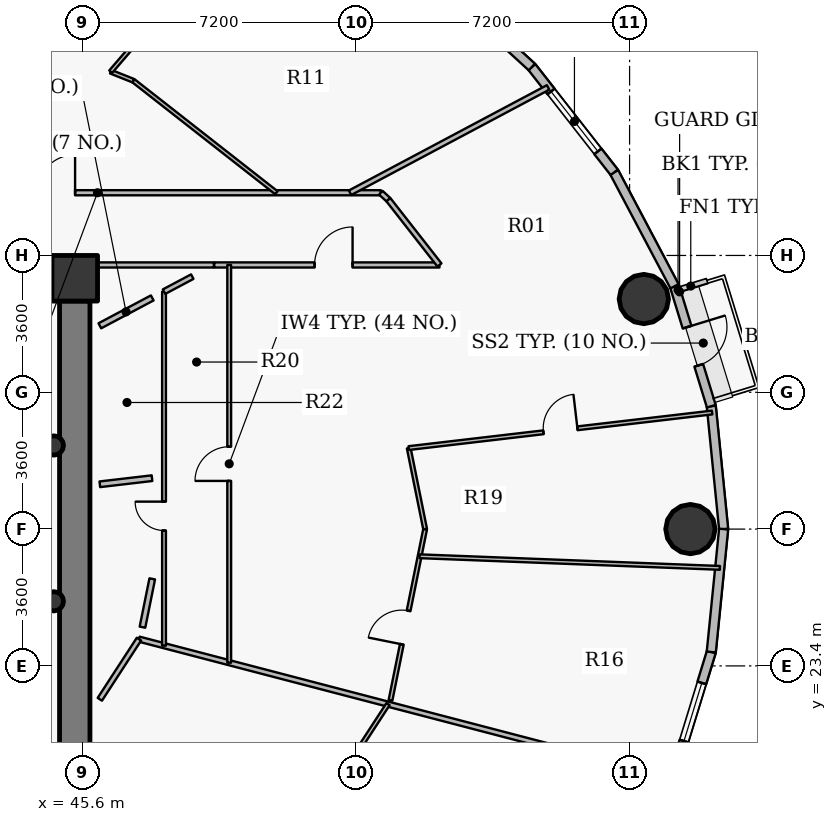
"""IFC4 building model, lengths in metres.
Left out: names, types, materials, properties, quantities, classifications, styles, units other than length and angle.
Written with IfcOpenShell. Run it as: python <this file> out.ifc"""

import sys

from ifc_helpers import new_model, si_unit, direction, frame, frame_2d, origin, origin_2d, place, context, subcontext, project, spatial, rectangle, hollow_circle, extrude, source, transform, mapped, element, fill, save


model = new_model("IFC4")
c1 = context("Model", 3, precision=1e-05, world=origin(), true_north=direction((0.0, 1.0)))
c2 = subcontext(c1, "Body", "Model", "MODEL_VIEW")
j1 = project(units=[si_unit("LENGTHUNIT", "METRE"), si_unit("PLANEANGLEUNIT", "RADIAN")], contexts=[c1])
p1 = place(None, origin())
s1 = spatial("IfcSite", under=j1, at=p1, CompositionType="ELEMENT")
p2 = place(p1, origin())
s2 = spatial("IfcBuilding", under=s1, at=p2, CompositionType="ELEMENT")
p3 = place(p2, frame((0.0, 0.0, 178.65)))
s3 = spatial("IfcBuildingStorey", under=s2, at=p3, CompositionType="ELEMENT", Elevation=178.65)
p4 = place(p3, frame((45.4, 33.6, 0.0), z_axis=(0.0, 0.0, 1.0), x_axis=(1.0, 0.0, 0.0)))
e1 = element("IfcColumn", 1, at=p4, inside=s3, PredefinedType="COLUMN", context=c2, shape_type="SweptSolid", body=[
    extrude(rectangle(XDim=1.2, YDim=1.2, at=origin_2d()), origin(), (0.0, 0.0, 1.0), 3.75),
])
p5 = place(p3, frame((45.4, 33.0, 0.0), z_axis=(0.0, 0.0, 1.0), x_axis=(0.0, -1.0, 0.0)))
e2 = element("IfcWall", 2, at=p5, inside=s3, PredefinedType="SHEAR", context=c2, shape_type="SweptSolid", body=[
    extrude(rectangle(XDim=12.0, YDim=0.8, at=frame_2d((6.0, 0.0))), origin(), (0.0, 0.0, 1.0), 2.95),
])
for number, where, z_axis, x_axis in (
    (3, (61.6, 27.0, 0.0), (0.0, 0.0, 1.0), (1.0, 0.0, 0.0)),
    (4, (60.375, 33.053, 0.0), (0.0, 0.0, 1.0), (1.0, 0.0, 0.0)),
):
    element("IfcColumn", number, at=place(p3, frame(where, z_axis=z_axis, x_axis=x_axis)), inside=s3, PredefinedType="COLUMN", context=c2, shape_type="SweptSolid", body=[
        extrude(hollow_circle(Radius=0.65, WallThickness=0.04, at=origin_2d()), origin(), (0.0, 0.0, 1.0), 3.75),
    ])
for number, where, z_axis, x_axis in (
    (5, (44.85, 25.1, 0.0), (0.0, 0.0, 1.0), (1.0, 0.0, 0.0)),
    (6, (44.85, 29.2, 0.0), (0.0, 0.0, 1.0), (1.0, 0.0, 0.0)),
):
    element("IfcColumn", number, at=place(p3, frame(where, z_axis=z_axis, x_axis=x_axis)), inside=s3, PredefinedType="COLUMN", context=c2, shape_type="SweptSolid", body=[
        extrude(hollow_circle(Radius=0.254, WallThickness=0.02, at=origin_2d()), origin(), (0.0, 0.0, 1.0), 3.75),
    ])
p6 = place(p3, frame((62.15, 30.234, 0.0), z_axis=(0.0, 0.0, 1.0), x_axis=(0.100061534614, -0.994981250723, 0.0)))
e7 = element("IfcWall", 7, at=p6, inside=s3, PredefinedType="SOLIDWALL", context=c2, shape_type="SweptSolid", body=[
    extrude(rectangle(XDim=3.25, YDim=0.24, at=frame_2d((1.625, 0.0))), origin(), (0.0, 0.0, 1.0), 3.5),
])
p7 = place(p3, frame((61.183, 33.389, 0.0), z_axis=(0.0, 0.0, 1.0), x_axis=(0.293097995113, -0.956082405058, 0.0)))
e8 = element("IfcWall", 8, at=p7, inside=s3, PredefinedType="SOLIDWALL", context=c2, shape_type="SweptSolid", body=[
    extrude(rectangle(XDim=3.3, YDim=0.24, at=frame_2d((1.65, 0.0))), origin(), (0.0, 0.0, 1.0), 3.5),
])
p8 = place(p7, frame((1.125, 0.0, 0.0)))
e9 = element("IfcOpeningElement", 9, at=p8, cuts=e8, PredefinedType="OPENING", context=c2, shape_type="SweptSolid", body=[
    extrude(rectangle(XDim=1.05, YDim=2.15, at=origin_2d()), frame((0.525, 0.13, 1.075), z_axis=(0.0, -1.0, 0.0), x_axis=(1.0, 0.0, 0.0)), (0.0, 0.0, 1.0), 0.26),
])
p9 = place(p3, frame((59.596, 36.388, 0.0), z_axis=(0.0, 0.0, 1.0), x_axis=(0.467586874938, -0.88394712194, 0.0)))
e10 = element("IfcWall", 10, at=p9, inside=s3, PredefinedType="SOLIDWALL", context=c2, shape_type="SweptSolid", body=[
    extrude(rectangle(XDim=3.393, YDim=0.24, at=frame_2d((1.697, 0.0))), origin(), (0.0, 0.0, 1.0), 3.5),
])
p10 = place(p3, frame((57.428, 39.158, 0.0), z_axis=(0.0, 0.0, 1.0), x_axis=(0.616287674549, -0.787521112224, 0.0)))
e11 = element("IfcWall", 11, at=p10, inside=s3, PredefinedType="SOLIDWALL", context=c2, shape_type="SweptSolid", body=[
    extrude(rectangle(XDim=3.517, YDim=0.24, at=frame_2d((1.759, 0.0))), origin(), (0.0, 0.0, 1.0), 3.5),
])
p11 = place(p10, frame((0.819, 0.0, 0.9)))
e12 = element("IfcOpeningElement", 12, at=p11, cuts=e11, PredefinedType="OPENING", context=c2, shape_type="SweptSolid", body=[
    extrude(rectangle(XDim=2.0, YDim=1.75, at=origin_2d()), frame((1.0, 0.13, 0.875), z_axis=(0.0, -1.0, 0.0), x_axis=(1.0, 0.0, 0.0)), (0.0, 0.0, 1.0), 0.26),
])
p12 = place(p3, frame((54.732, 41.631, 0.0), z_axis=(0.0, 0.0, 1.0), x_axis=(0.737076565834, -0.675809245349, 0.0)))
e13 = element("IfcWall", 13, at=p12, inside=s3, PredefinedType="SOLIDWALL", context=c2, shape_type="SweptSolid", body=[
    extrude(rectangle(XDim=3.658, YDim=0.24, at=frame_2d((1.829, 0.0))), origin(), (0.0, 0.0, 1.0), 3.5),
])
p13 = place(p3, frame((62.15, 23.766, 0.0), z_axis=(0.0, 0.0, 1.0), x_axis=(-0.293097995113, -0.956082405058, 0.0)))
e14 = element("IfcWall", 14, at=p13, inside=s3, PredefinedType="SOLIDWALL", context=c2, shape_type="SweptSolid", body=[
    extrude(rectangle(XDim=3.3, YDim=0.24, at=frame_2d((1.65, 0.0))), origin(), (0.0, 0.0, 1.0), 3.5),
])
p14 = place(p13, frame((0.85, 0.0, 0.9)))
e15 = element("IfcOpeningElement", 15, at=p14, cuts=e14, PredefinedType="OPENING", context=c2, shape_type="SweptSolid", body=[
    extrude(rectangle(XDim=1.6, YDim=1.75, at=origin_2d()), frame((0.8, 0.13, 0.875), z_axis=(0.0, -1.0, 0.0), x_axis=(1.0, 0.0, 0.0)), (0.0, 0.0, 1.0), 0.26),
])
p15 = place(p3, frame((62.475, 27.0, 0.0), z_axis=(0.0, 0.0, 1.0), x_axis=(-0.100061534614, -0.994981250723, 0.0)))
e16 = element("IfcWall", 16, at=p15, inside=s3, PredefinedType="SOLIDWALL", context=c2, shape_type="SweptSolid", body=[
    extrude(rectangle(XDim=3.25, YDim=0.24, at=frame_2d((1.625, 0.0))), origin(), (0.0, 0.0, 1.0), 3.5),
])
p16 = place(p3, frame((38.541, 35.85, 0.0), z_axis=(0.0, 0.0, 1.0), x_axis=(1.0, 0.0, 0.0)))
e17 = element("IfcWall", 17, at=p16, inside=s3, PredefinedType="PARTITIONING", context=c2, shape_type="SweptSolid", body=[
    extrude(rectangle(XDim=14.913, YDim=0.135, at=frame_2d((7.456, 0.0))), origin(), (0.0, 0.0, 1.0), 2.935),
])
p17 = place(p16, frame((5.868, 0.0, 0.0)))
e18 = element("IfcOpeningElement", 18, at=p17, cuts=e17, PredefinedType="OPENING", context=c2, shape_type="SweptSolid", body=[
    extrude(rectangle(XDim=1.0, YDim=2.15, at=origin_2d()), frame((0.5, 0.078, 1.075), z_axis=(0.0, -1.0, 0.0), x_axis=(1.0, 0.0, 0.0)), (0.0, 0.0, 1.0), 0.155),
])
p18 = place(p3, frame((46.346, 39.035, 0.0), z_axis=(0.0, 0.0, 1.0), x_axis=(0.928841988182, -0.370476127423, 0.0)))
e19 = element("IfcWall", 19, at=p18, inside=s3, PredefinedType="PARTITIONING", context=c2, shape_type="SweptSolid", body=[
    extrude(rectangle(XDim=0.645, YDim=0.1, at=frame_2d((0.322, 0.0))), origin(), (0.0, 0.0, 1.0), 3.5),
])
p19 = place(p3, frame((46.346, 39.035, 0.0), z_axis=(0.0, 0.0, 1.0), x_axis=(0.651891052095, 0.758312637504, 0.0)))
e20 = element("IfcWall", 20, at=p19, inside=s3, PredefinedType="PARTITIONING", context=c2, shape_type="SweptSolid", body=[
    extrude(rectangle(XDim=6.742, YDim=0.1, at=frame_2d((3.371, 0.0))), origin(), (0.0, 0.0, 1.0), 2.935),
])
p20 = place(p19, frame((2.921, 0.0, 0.0)))
e21 = element("IfcOpeningElement", 21, at=p20, cuts=e20, PredefinedType="OPENING", context=c2, shape_type="SweptSolid", body=[
    extrude(rectangle(XDim=0.9, YDim=2.1, at=origin_2d()), frame((0.45, 0.06, 1.05), z_axis=(0.0, -1.0, 0.0), x_axis=(1.0, 0.0, 0.0)), (0.0, 0.0, 1.0), 0.12),
])
p21 = place(p3, frame((46.945, 38.796, 0.0), z_axis=(0.0, 0.0, 1.0), x_axis=(0.787326008068, -0.616536906454, 0.0)))
e22 = element("IfcWall", 22, at=p21, inside=s3, PredefinedType="PARTITIONING", context=c2, shape_type="SweptSolid", body=[
    extrude(rectangle(XDim=4.779, YDim=0.1, at=frame_2d((2.389, 0.0))), origin(), (0.0, 0.0, 1.0), 2.935),
])
p22 = place(p3, frame((47.09, 24.105, 0.0), z_axis=(0.0, 0.0, 1.0), x_axis=(0.967573213792, -0.252590728159, 0.0)))
e23 = element("IfcWall", 23, at=p22, inside=s3, PredefinedType="PARTITIONING", context=c2, shape_type="SweptSolid", body=[
    extrude(rectangle(XDim=14.481, YDim=0.135, at=frame_2d((7.24, 0.0))), origin(), (0.0, 0.0, 1.0), 2.935),
])
p23 = place(p3, frame((47.749, 23.933, 0.0), z_axis=(0.0, 0.0, 1.0), x_axis=(0.0, 1.0, 0.0)))
e24 = element("IfcWall", 24, at=p23, inside=s3, PredefinedType="PARTITIONING", context=c2, shape_type="SweptSolid", body=[
    extrude(rectangle(XDim=9.314, YDim=0.1, at=frame_2d((4.657, 0.0))), origin(), (0.0, 0.0, 1.0), 2.935),
])
p24 = place(p23, frame((3.03, 0.0, 0.0)))
e25 = element("IfcOpeningElement", 25, at=p24, cuts=e24, PredefinedType="OPENING", context=c2, shape_type="SweptSolid", body=[
    extrude(rectangle(XDim=0.76, YDim=2.1, at=origin_2d()), frame((0.38, 0.06, 1.05), z_axis=(0.0, -1.0, 0.0), x_axis=(1.0, 0.0, 0.0)), (0.0, 0.0, 1.0), 0.12),
])
p25 = place(p3, frame((49.071, 33.95, 0.0), z_axis=(0.0, 0.0, 1.0), x_axis=(1.0, 0.0, 0.0)))
e26 = element("IfcWall", 26, at=p25, inside=s3, PredefinedType="PARTITIONING", context=c2, shape_type="SweptSolid", body=[
    extrude(rectangle(XDim=5.926, YDim=0.135, at=frame_2d((2.963, 0.0))), origin(), (0.0, 0.0, 1.0), 3.5),
])
p26 = place(p25, frame((2.64, 0.0, 0.0)))
e27 = element("IfcOpeningElement", 27, at=p26, cuts=e26, PredefinedType="OPENING", context=c2, shape_type="SweptSolid", body=[
    extrude(rectangle(XDim=1.0, YDim=2.15, at=origin_2d()), frame((0.5, 0.078, 1.075), z_axis=(0.0, -1.0, 0.0), x_axis=(1.0, 0.0, 0.0)), (0.0, 0.0, 1.0), 0.155),
])
p27 = place(p3, frame((49.464, 23.485, 0.0), z_axis=(0.0, 0.0, 1.0), x_axis=(0.0, 1.0, 0.0)))
e28 = element("IfcWall", 28, at=p27, inside=s3, PredefinedType="PARTITIONING", context=c2, shape_type="SweptSolid", body=[
    extrude(rectangle(XDim=10.465, YDim=0.1, at=frame_2d((5.232, 0.0))), origin(), (0.0, 0.0, 1.0), 2.935),
])
p28 = place(p27, frame((4.783, 0.0, 0.0)))
e29 = element("IfcOpeningElement", 29, at=p28, cuts=e28, PredefinedType="OPENING", context=c2, shape_type="SweptSolid", body=[
    extrude(rectangle(XDim=0.9, YDim=2.1, at=origin_2d()), frame((0.45, 0.06, 1.05), z_axis=(0.0, -1.0, 0.0), x_axis=(1.0, 0.0, 0.0)), (0.0, 0.0, 1.0), 0.12),
])
p29 = place(p3, frame((51.064, 18.429, 0.0), z_axis=(0.0, 0.0, 1.0), x_axis=(0.545362062942, 0.838200584767, 0.0)))
e30 = element("IfcWall", 30, at=p29, inside=s3, PredefinedType="PARTITIONING", context=c2, shape_type="SweptSolid", body=[
    extrude(rectangle(XDim=4.729, YDim=0.1, at=frame_2d((2.365, 0.0))), origin(), (0.0, 0.0, 1.0), 2.935),
])
p30 = place(p3, frame((52.645, 35.85, 0.0), z_axis=(0.0, 0.0, 1.0), x_axis=(0.882944268091, 0.469477815712, 0.0)))
e31 = element("IfcWall", 31, at=p30, inside=s3, PredefinedType="PARTITIONING", context=c2, shape_type="SweptSolid", body=[
    extrude(rectangle(XDim=5.902, YDim=0.135, at=frame_2d((2.951, 0.0))), origin(), (0.0, 0.0, 1.0), 2.935),
])
p31 = place(p3, frame((53.454, 35.85, 0.0), z_axis=(0.0, 0.0, 1.0), x_axis=(0.736667385572, -0.676255249913, 0.0)))
e32 = element("IfcWall", 32, at=p31, inside=s3, PredefinedType="PARTITIONING", context=c2, shape_type="SweptSolid", body=[
    extrude(rectangle(XDim=0.271, YDim=0.135, at=frame_2d((0.135, 0.0))), origin(), (0.0, 0.0, 1.0), 3.5),
])
p32 = place(p3, frame((53.653, 35.667, 0.0), z_axis=(0.0, 0.0, 1.0), x_axis=(0.616302223209, -0.787509726713, 0.0)))
e33 = element("IfcWall", 33, at=p32, inside=s3, PredefinedType="PARTITIONING", context=c2, shape_type="SweptSolid", body=[
    extrude(rectangle(XDim=2.18, YDim=0.135, at=frame_2d((1.09, 0.0))), origin(), (0.0, 0.0, 1.0), 3.5),
])
p33 = place(p3, frame((53.709, 22.494, 0.0), z_axis=(0.0, 0.0, 1.0), x_axis=(0.198239863178, 0.980153537282, 0.0)))
e34 = element("IfcWall", 34, at=p33, inside=s3, PredefinedType="PARTITIONING", context=c2, shape_type="SweptSolid", body=[
    extrude(rectangle(XDim=4.597, YDim=0.1, at=frame_2d((2.299, 0.0))), origin(), (0.0, 0.0, 1.0), 2.935),
])
p34 = place(p33, frame((1.504, 0.0, 0.0)))
e35 = element("IfcOpeningElement", 35, at=p34, cuts=e34, PredefinedType="OPENING", context=c2, shape_type="SweptSolid", body=[
    extrude(rectangle(XDim=0.9, YDim=2.1, at=origin_2d()), frame((0.45, 0.06, 1.05), z_axis=(0.0, -1.0, 0.0), x_axis=(1.0, 0.0, 0.0)), (0.0, 0.0, 1.0), 0.12),
])
p35 = place(p3, frame((54.189, 29.132, 0.0), z_axis=(0.0, 0.0, 1.0), x_axis=(0.198252946245, -0.98015089109, 0.0)))
e36 = element("IfcWall", 36, at=p35, inside=s3, PredefinedType="PARTITIONING", context=c2, shape_type="SweptSolid", body=[
    extrude(rectangle(XDim=2.175, YDim=0.1, at=frame_2d((1.087, 0.0))), origin(), (0.0, 0.0, 1.0), 2.935),
])
p36 = place(p3, frame((54.189, 29.132, 0.0), z_axis=(0.0, 0.0, 1.0), x_axis=(0.993202342674, 0.116400629328, 0.0)))
e37 = element("IfcWall", 37, at=p36, inside=s3, PredefinedType="PARTITIONING", context=c2, shape_type="SweptSolid", body=[
    extrude(rectangle(XDim=8.037, YDim=0.1, at=frame_2d((4.019, 0.0))), origin(), (0.0, 0.0, 1.0), 2.935),
])
p37 = place(p36, frame((3.569, 0.0, 0.0)))
e38 = element("IfcOpeningElement", 38, at=p37, cuts=e37, PredefinedType="OPENING", context=c2, shape_type="SweptSolid", body=[
    extrude(rectangle(XDim=0.9, YDim=2.1, at=origin_2d()), frame((0.45, 0.06, 1.05), z_axis=(0.0, -1.0, 0.0), x_axis=(1.0, 0.0, 0.0)), (0.0, 0.0, 1.0), 0.12),
])
p38 = place(p3, frame((54.475, 26.285, 0.0), z_axis=(0.0, 0.0, 1.0), x_axis=(0.999251521297, -0.03868329336, 0.0)))
e39 = element("IfcWall", 39, at=p38, inside=s3, PredefinedType="PARTITIONING", context=c2, shape_type="SweptSolid", body=[
    extrude(rectangle(XDim=7.908, YDim=0.1, at=frame_2d((3.954, 0.0))), origin(), (0.0, 0.0, 1.0), 2.935),
])
p39 = place(p3, frame((49.061, 33.95, 0.0), z_axis=(0.0, 0.0, 1.0), x_axis=(-1.0, 0.0, 0.0)))
e40 = element("IfcWall", 40, at=p39, inside=s3, PredefinedType="PARTITIONING", context=c2, shape_type="SweptSolid", body=[
    extrude(rectangle(XDim=3.261, YDim=0.135, at=frame_2d((1.63, 0.0))), origin(), (0.0, 0.0, 1.0), 3.5),
])
p40 = place(p3, frame((45.79, 34.0, 0.0), z_axis=(0.0, 0.0, 1.0), x_axis=(-1.0, 0.0, 0.0)))
e41 = element("IfcWall", 41, at=p40, inside=s3, PredefinedType="PARTITIONING", context=c2, shape_type="SweptSolid", body=[
    extrude(rectangle(XDim=0.98, YDim=0.135, at=frame_2d((0.49, 0.0))), origin(), (0.0, 0.0, 1.0), 2.935),
])
p41 = place(p3, frame((46.06, 22.521, 0.0), z_axis=(0.0, 0.0, 1.0), x_axis=(0.545329049498, 0.838222063521, 0.0)))
e42 = element("IfcWall", 42, at=p41, inside=s3, PredefinedType="PARTITIONING", context=c2, shape_type="SweptSolid", body=[
    extrude(rectangle(XDim=1.889, YDim=0.135, at=frame_2d((0.944, 0.0))), origin(), (0.0, 0.0, 1.0), 2.935),
])
p42 = place(p3, frame((47.433, 28.34, 0.0), z_axis=(0.0, 0.0, 1.0), x_axis=(-0.993204743367, -0.116380143293, 0.0)))
e43 = element("IfcWall", 43, at=p42, inside=s3, PredefinedType="PARTITIONING", context=c2, shape_type="SweptSolid", body=[
    extrude(rectangle(XDim=1.382, YDim=0.15, at=frame_2d((0.691, 0.0))), origin(), (0.0, 0.0, 1.0), 3.5),
])
p43 = place(p3, frame((46.06, 32.349, 0.0), z_axis=(0.0, 0.0, 1.0), x_axis=(0.882988187469, 0.469395207465, 0.0)))
e44 = element("IfcWall", 44, at=p43, inside=s3, PredefinedType="PARTITIONING", context=c2, shape_type="SweptSolid", body=[
    extrude(rectangle(XDim=1.562, YDim=0.15, at=frame_2d((0.781, 0.0))), origin(), (0.0, 0.0, 1.0), 3.5),
])
p44 = place(p3, frame((47.182, 24.419, 0.0), z_axis=(0.0, 0.0, 1.0), x_axis=(0.198178705385, 0.980165904698, 0.0)))
e45 = element("IfcWall", 45, at=p44, inside=s3, PredefinedType="PARTITIONING", context=c2, shape_type="SweptSolid", body=[
    extrude(rectangle(XDim=1.297, YDim=0.15, at=frame_2d((0.648, 0.0))), origin(), (0.0, 0.0, 1.0), 3.5),
])
p45 = place(p3, frame((47.749, 33.247, 0.0), z_axis=(0.0, 0.0, 1.0), x_axis=(0.882834022315, 0.469685095616, 0.0)))
e46 = element("IfcWall", 46, at=p45, inside=s3, PredefinedType="PARTITIONING", context=c2, shape_type="SweptSolid", body=[
    extrude(rectangle(XDim=0.842, YDim=0.135, at=frame_2d((0.421, 0.0))), origin(), (0.0, 0.0, 1.0), 3.5),
])
m1 = source(origin(), c2, "Body", "SweptSolid", [
    extrude(rectangle(XDim=1.05, YDim=2.15, at=origin_2d()), frame((0.525, 0.025, 1.075), z_axis=(0.0, -1.0, 0.0), x_axis=(1.0, 0.0, 0.0)), (0.0, 0.0, 1.0), 0.05),
])
p46 = place(p8, origin())
e47 = element("IfcDoor", 47, at=p46, inside=s3, OperationType="SINGLE_SWING_LEFT", PredefinedType="DOOR", context=c2, shape_type="MappedRepresentation", body=[
    mapped(m1, transform((0.0, 0.0, 0.0), x_axis=(1.0, 0.0, 0.0), y_axis=(0.0, 1.0, 0.0), z_axis=(0.0, 0.0, 1.0), scale=1.0)),
])
fill(e9, e47)
m2 = source(origin(), c2, "Body", "SweptSolid", [
    extrude(rectangle(XDim=2.0, YDim=1.75, at=origin_2d()), frame((1.0, 0.03, 0.875), z_axis=(0.0, -1.0, 0.0), x_axis=(1.0, 0.0, 0.0)), (0.0, 0.0, 1.0), 0.06),
])
p47 = place(p11, origin())
e48 = element("IfcWindow", 48, at=p47, inside=s3, PartitioningType="DOUBLE_PANEL_VERTICAL", PredefinedType="WINDOW", context=c2, shape_type="MappedRepresentation", body=[
    mapped(m2, transform((0.0, 0.0, 0.0), x_axis=(1.0, 0.0, 0.0), y_axis=(0.0, 1.0, 0.0), z_axis=(0.0, 0.0, 1.0), scale=1.0)),
])
fill(e12, e48)
m3 = source(origin(), c2, "Body", "SweptSolid", [
    extrude(rectangle(XDim=1.6, YDim=1.75, at=origin_2d()), frame((0.8, 0.03, 0.875), z_axis=(0.0, -1.0, 0.0), x_axis=(1.0, 0.0, 0.0)), (0.0, 0.0, 1.0), 0.06),
])
p48 = place(p14, origin())
e49 = element("IfcWindow", 49, at=p48, inside=s3, PartitioningType="DOUBLE_PANEL_VERTICAL", PredefinedType="WINDOW", context=c2, shape_type="MappedRepresentation", body=[
    mapped(m3, transform((0.0, 0.0, 0.0), x_axis=(1.0, 0.0, 0.0), y_axis=(0.0, 1.0, 0.0), z_axis=(0.0, 0.0, 1.0), scale=1.0)),
])
fill(e15, e49)
m4 = source(origin(), c2, "Body", "SweptSolid", [
    extrude(rectangle(XDim=1.0, YDim=2.15, at=origin_2d()), frame((0.5, 0.025, 1.075), z_axis=(0.0, -1.0, 0.0), x_axis=(1.0, 0.0, 0.0)), (0.0, 0.0, 1.0), 0.05),
])
p49 = place(p17, origin())
e50 = element("IfcDoor", 50, at=p49, inside=s3, OperationType="SINGLE_SWING_RIGHT", PredefinedType="DOOR", context=c2, shape_type="MappedRepresentation", body=[
    mapped(m4, transform((0.0, 0.0, 0.0), x_axis=(1.0, 0.0, 0.0), y_axis=(0.0, 1.0, 0.0), z_axis=(0.0, 0.0, 1.0), scale=1.0)),
])
fill(e18, e50)
p50 = place(p26, origin())
e51 = element("IfcDoor", 51, at=p50, inside=s3, OperationType="SINGLE_SWING_RIGHT", PredefinedType="DOOR", context=c2, shape_type="MappedRepresentation", body=[
    mapped(m4, transform((0.0, 0.0, 0.0), x_axis=(1.0, 0.0, 0.0), y_axis=(0.0, 1.0, 0.0), z_axis=(0.0, 0.0, 1.0), scale=1.0)),
])
fill(e27, e51)
m5 = source(origin(), c2, "Body", "SweptSolid", [
    extrude(rectangle(XDim=0.9, YDim=2.1, at=origin_2d()), frame((0.45, 0.025, 1.05), z_axis=(0.0, -1.0, 0.0), x_axis=(1.0, 0.0, 0.0)), (0.0, 0.0, 1.0), 0.05),
])
p51 = place(p34, origin())
e52 = element("IfcDoor", 52, at=p51, inside=s3, OperationType="SINGLE_SWING_LEFT", PredefinedType="DOOR", context=c2, shape_type="MappedRepresentation", body=[
    mapped(m5, transform((0.0, 0.0, 0.0), x_axis=(1.0, 0.0, 0.0), y_axis=(0.0, 1.0, 0.0), z_axis=(0.0, 0.0, 1.0), scale=1.0)),
])
fill(e35, e52)
p52 = place(p37, origin())
e53 = element("IfcDoor", 53, at=p52, inside=s3, OperationType="SINGLE_SWING_RIGHT", PredefinedType="DOOR", context=c2, shape_type="MappedRepresentation", body=[
    mapped(m5, transform((0.0, 0.0, 0.0), x_axis=(1.0, 0.0, 0.0), y_axis=(0.0, 1.0, 0.0), z_axis=(0.0, 0.0, 1.0), scale=1.0)),
])
fill(e38, e53)
p53 = place(p28, origin())
e54 = element("IfcDoor", 54, at=p53, inside=s3, OperationType="SINGLE_SWING_LEFT", PredefinedType="DOOR", context=c2, shape_type="MappedRepresentation", body=[
    mapped(m5, transform((0.0, 0.0, 0.0), x_axis=(1.0, 0.0, 0.0), y_axis=(0.0, 1.0, 0.0), z_axis=(0.0, 0.0, 1.0), scale=1.0)),
])
fill(e29, e54)
m6 = source(origin(), c2, "Body", "SweptSolid", [
    extrude(rectangle(XDim=0.76, YDim=2.1, at=origin_2d()), frame((0.38, 0.025, 1.05), z_axis=(0.0, -1.0, 0.0), x_axis=(1.0, 0.0, 0.0)), (0.0, 0.0, 1.0), 0.05),
])
p54 = place(p24, origin())
e55 = element("IfcDoor", 55, at=p54, inside=s3, OperationType="SINGLE_SWING_RIGHT", PredefinedType="DOOR", context=c2, shape_type="MappedRepresentation", body=[
    mapped(m6, transform((0.0, 0.0, 0.0), x_axis=(1.0, 0.0, 0.0), y_axis=(0.0, 1.0, 0.0), z_axis=(0.0, 0.0, 1.0), scale=1.0)),
])
fill(e25, e55)
save(model, sys.argv[1])
